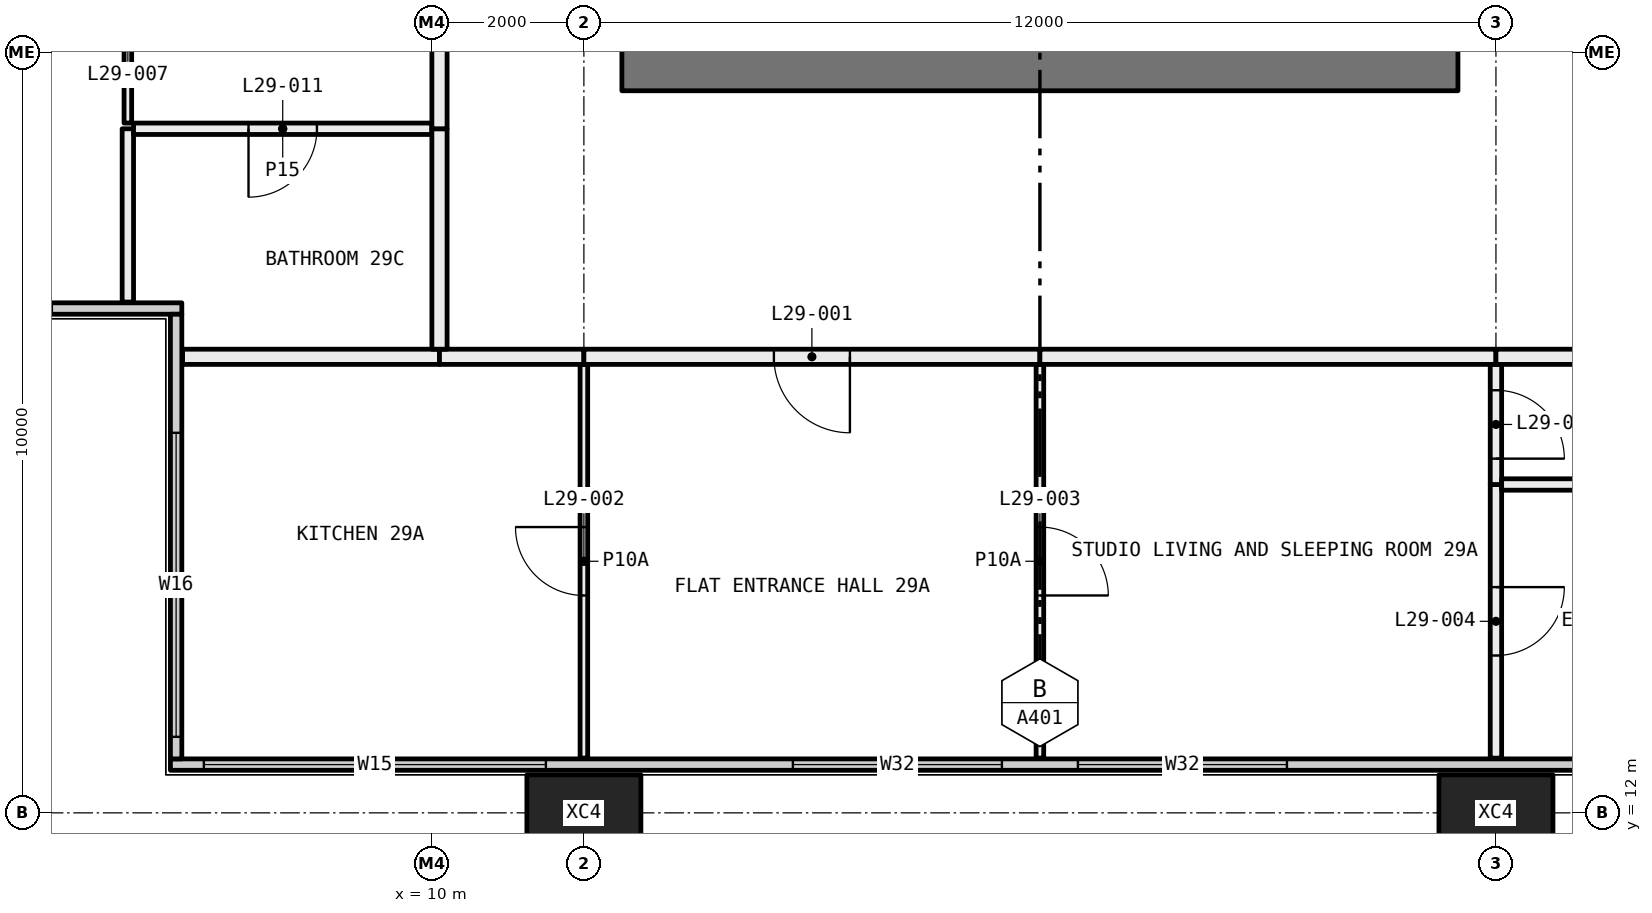
"""IFC4 building model, lengths in metres.
Left out: names, types, materials, properties, quantities, classifications, styles, units other than length and angle.
Written with IfcOpenShell. Run it as: python <this file> out.ifc"""

import sys

from ifc_helpers import new_model, si_unit, direction, frame, frame_2d, origin, origin_2d, place, context, subcontext, project, spatial, rectangle, hollow_rectangle, extrude, element, fill, save


model = new_model("IFC4")
c1 = context("Model", 3, precision=1e-05, world=origin(), true_north=direction((0.0, 1.0)))
c2 = subcontext(c1, "Body", "Model", "MODEL_VIEW")
j1 = project(units=[si_unit("LENGTHUNIT", "METRE"), si_unit("PLANEANGLEUNIT", "RADIAN")], contexts=[c1])
p1 = place(None, origin())
s1 = spatial("IfcSite", under=j1, at=p1, CompositionType="ELEMENT")
p2 = place(p1, origin())
s2 = spatial("IfcBuilding", under=s1, at=p2, CompositionType="ELEMENT")
p3 = place(p2, frame((0.0, 0.0, 113.85)))
s3 = spatial("IfcBuildingStorey", under=s2, at=p3, CompositionType="ELEMENT", Elevation=113.85)
for number, where, z_axis, x_axis in (
    (1, (12.0, 12.0, -0.4), (0.0, 0.0, 1.0), (1.0, 0.0, 0.0)),
    (2, (24.0, 12.0, -0.4), (0.0, 0.0, 1.0), (1.0, 0.0, 0.0)),
):
    element("IfcColumn", number, at=place(p3, frame(where, z_axis=z_axis, x_axis=x_axis)), inside=s3, PredefinedType="COLUMN", context=c2, shape_type="SweptSolid", body=[
        extrude(hollow_rectangle(XDim=1.5, YDim=1.0, WallThickness=0.06, at=origin_2d()), origin(), (0.0, 0.0, 1.0), 3.45),
    ])
p4 = place(p3, frame((6.56, 12.635, 0.0), z_axis=(0.0, 0.0, 1.0), x_axis=(1.0, 0.0, 0.0)))
e3 = element("IfcWall", 3, at=p4, inside=s3, PredefinedType="ELEMENTEDWALL", context=c2, shape_type="SweptSolid", body=[
    extrude(rectangle(XDim=58.88, YDim=0.15, at=frame_2d((29.44, 0.0))), origin(), (0.0, 0.0, 1.0), 3.05),
])
p5 = place(p4, frame((0.44, 0.0, 0.45)))
e4 = element("IfcOpeningElement", 4, at=p5, cuts=e3, PredefinedType="OPENING", context=c2, shape_type="SweptSolid", body=[
    extrude(rectangle(XDim=4.5, YDim=2.55, at=frame_2d((2.25, 1.275))), frame((0.0, 0.085, 0.0), z_axis=(0.0, -1.0, 0.0), x_axis=(1.0, 0.0, 0.0)), (0.0, 0.0, 1.0), 0.17),
])
p6 = place(p4, frame((8.19, 0.0, 0.45)))
e5 = element("IfcOpeningElement", 5, at=p6, cuts=e3, PredefinedType="OPENING", context=c2, shape_type="SweptSolid", body=[
    extrude(rectangle(XDim=2.75, YDim=2.55, at=frame_2d((1.375, 1.275))), frame((0.0, 0.085, 0.0), z_axis=(0.0, -1.0, 0.0), x_axis=(1.0, 0.0, 0.0)), (0.0, 0.0, 1.0), 0.17),
])
p7 = place(p4, frame((11.94, 0.0, 0.45)))
e6 = element("IfcOpeningElement", 6, at=p7, cuts=e3, PredefinedType="OPENING", context=c2, shape_type="SweptSolid", body=[
    extrude(rectangle(XDim=2.75, YDim=2.55, at=frame_2d((1.375, 1.275))), frame((0.0, 0.085, 0.0), z_axis=(0.0, -1.0, 0.0), x_axis=(1.0, 0.0, 0.0)), (0.0, 0.0, 1.0), 0.17),
])
p8 = place(p4, frame((20.19, 0.0, 0.45)))
e7 = element("IfcOpeningElement", 7, at=p8, cuts=e3, PredefinedType="OPENING", context=c2, shape_type="SweptSolid", body=[
    extrude(rectangle(XDim=2.75, YDim=2.55, at=frame_2d((1.375, 1.275))), frame((0.0, 0.085, 0.0), z_axis=(0.0, -1.0, 0.0), x_axis=(1.0, 0.0, 0.0)), (0.0, 0.0, 1.0), 0.17),
])
p9 = place(p4, frame((23.94, 0.0, 0.45)))
e8 = element("IfcOpeningElement", 8, at=p9, cuts=e3, PredefinedType="OPENING", context=c2, shape_type="SweptSolid", body=[
    extrude(rectangle(XDim=2.0, YDim=2.55, at=frame_2d((1.0, 1.275))), frame((0.0, 0.085, 0.0), z_axis=(0.0, -1.0, 0.0), x_axis=(1.0, 0.0, 0.0)), (0.0, 0.0, 1.0), 0.17),
])
p10 = place(p4, frame((32.19, 0.0, 0.45)))
e9 = element("IfcOpeningElement", 9, at=p10, cuts=e3, PredefinedType="OPENING", context=c2, shape_type="SweptSolid", body=[
    extrude(rectangle(XDim=2.75, YDim=2.55, at=frame_2d((1.375, 1.275))), frame((0.0, 0.085, 0.0), z_axis=(0.0, -1.0, 0.0), x_axis=(1.0, 0.0, 0.0)), (0.0, 0.0, 1.0), 0.17),
])
p11 = place(p4, frame((35.94, 0.0, 0.45)))
e10 = element("IfcOpeningElement", 10, at=p11, cuts=e3, PredefinedType="OPENING", context=c2, shape_type="SweptSolid", body=[
    extrude(rectangle(XDim=2.75, YDim=2.55, at=frame_2d((1.375, 1.275))), frame((0.0, 0.085, 0.0), z_axis=(0.0, -1.0, 0.0), x_axis=(1.0, 0.0, 0.0)), (0.0, 0.0, 1.0), 0.17),
])
p12 = place(p4, frame((44.19, 0.0, 0.45)))
e11 = element("IfcOpeningElement", 11, at=p12, cuts=e3, PredefinedType="OPENING", context=c2, shape_type="SweptSolid", body=[
    extrude(rectangle(XDim=2.75, YDim=2.55, at=frame_2d((1.375, 1.275))), frame((0.0, 0.085, 0.0), z_axis=(0.0, -1.0, 0.0), x_axis=(1.0, 0.0, 0.0)), (0.0, 0.0, 1.0), 0.17),
])
p13 = place(p4, frame((47.94, 0.0, 0.45)))
e12 = element("IfcOpeningElement", 12, at=p13, cuts=e3, PredefinedType="OPENING", context=c2, shape_type="SweptSolid", body=[
    extrude(rectangle(XDim=2.0, YDim=2.55, at=frame_2d((1.0, 1.275))), frame((0.0, 0.085, 0.0), z_axis=(0.0, -1.0, 0.0), x_axis=(1.0, 0.0, 0.0)), (0.0, 0.0, 1.0), 0.17),
])
p14 = place(p4, frame((53.94, 0.0, 0.45)))
e13 = element("IfcOpeningElement", 13, at=p14, cuts=e3, PredefinedType="OPENING", context=c2, shape_type="SweptSolid", body=[
    extrude(rectangle(XDim=4.5, YDim=2.55, at=frame_2d((2.25, 1.275))), frame((0.0, 0.085, 0.0), z_axis=(0.0, -1.0, 0.0), x_axis=(1.0, 0.0, 0.0)), (0.0, 0.0, 1.0), 0.17),
])
p15 = place(p3, frame((0.56, 18.635, 0.0), z_axis=(0.0, 0.0, 1.0), x_axis=(1.0, 0.0, 0.0)))
e14 = element("IfcWall", 14, at=p15, inside=s3, PredefinedType="ELEMENTEDWALL", context=c2, shape_type="SweptSolid", body=[
    extrude(rectangle(XDim=6.15, YDim=0.15, at=frame_2d((3.075, 0.0))), origin(), (0.0, 0.0, 1.0), 3.05),
])
p16 = place(p15, frame((0.44, 0.0, 0.45)))
e15 = element("IfcOpeningElement", 15, at=p16, cuts=e14, PredefinedType="OPENING", context=c2, shape_type="SweptSolid", body=[
    extrude(rectangle(XDim=4.0, YDim=2.55, at=frame_2d((2.0, 1.275))), frame((0.0, 0.085, 0.0), z_axis=(0.0, -1.0, 0.0), x_axis=(1.0, 0.0, 0.0)), (0.0, 0.0, 1.0), 0.17),
])
p17 = place(p3, frame((6.635, 12.71, 0.0), z_axis=(0.0, 0.0, 1.0), x_axis=(0.0, 1.0, 0.0)))
e16 = element("IfcWall", 16, at=p17, inside=s3, PredefinedType="ELEMENTEDWALL", context=c2, shape_type="SweptSolid", body=[
    extrude(rectangle(XDim=5.85, YDim=0.15, at=frame_2d((2.925, 0.0))), origin(), (0.0, 0.0, 1.0), 3.05),
])
p18 = place(p17, frame((0.29, 0.0, 0.45)))
e17 = element("IfcOpeningElement", 17, at=p18, cuts=e16, PredefinedType="OPENING", context=c2, shape_type="SweptSolid", body=[
    extrude(rectangle(XDim=4.0, YDim=2.55, at=frame_2d((2.0, 1.275))), frame((0.0, 0.085, 0.0), z_axis=(0.0, -1.0, 0.0), x_axis=(1.0, 0.0, 0.0)), (0.0, 0.0, 1.0), 0.17),
])
p19 = place(p3, frame((12.0, 12.72, 0.0), z_axis=(0.0, 0.0, 1.0), x_axis=(0.0, 1.0, 0.0)))
e18 = element("IfcWall", 18, at=p19, inside=s3, PredefinedType="PARTITIONING", context=c2, shape_type="SweptSolid", body=[
    extrude(rectangle(XDim=5.18, YDim=0.1, at=frame_2d((2.59, 0.0))), origin(), (0.0, 0.0, 1.0), 3.05),
])
p20 = place(p19, frame((2.14, 0.0, 0.0)))
e19 = element("IfcOpeningElement", 19, at=p20, cuts=e18, PredefinedType="OPENING", context=c2, shape_type="SweptSolid", body=[
    extrude(rectangle(XDim=0.9, YDim=2.1, at=frame_2d((0.45, 1.05))), frame((0.0, 0.06, 0.0), z_axis=(0.0, -1.0, 0.0), x_axis=(1.0, 0.0, 0.0)), (0.0, 0.0, 1.0), 0.12),
])
p21 = place(p3, frame((10.1, 18.0, 0.0), z_axis=(0.0, 0.0, 1.0), x_axis=(-1.0, 0.0, 0.0)))
e20 = element("IfcWall", 20, at=p21, inside=s3, PredefinedType="PARTITIONING", context=c2, shape_type="SweptSolid", body=[
    extrude(rectangle(XDim=3.38, YDim=0.2, at=frame_2d((1.69, 0.0))), origin(), (0.0, 0.0, 1.0), 3.05),
])
p22 = place(p3, frame((12.0, 18.0, 0.0), z_axis=(0.0, 0.0, 1.0), x_axis=(-1.0, 0.0, 0.0)))
e21 = element("IfcWall", 21, at=p22, inside=s3, PredefinedType="PARTITIONING", context=c2, shape_type="SweptSolid", body=[
    extrude(rectangle(XDim=1.9, YDim=0.2, at=frame_2d((0.95, 0.0))), origin(), (0.0, 0.0, 1.0), 3.05),
])
p23 = place(p3, frame((18.0, 12.72, 0.0), z_axis=(0.0, 0.0, 1.0), x_axis=(0.0, 1.0, 0.0)))
e22 = element("IfcWall", 22, at=p23, inside=s3, PredefinedType="PARTITIONING", context=c2, shape_type="SweptSolid", body=[
    extrude(rectangle(XDim=5.18, YDim=0.1, at=frame_2d((2.59, 0.0))), origin(), (0.0, 0.0, 1.0), 3.05),
])
p24 = place(p23, frame((2.14, 0.0, 0.0)))
e23 = element("IfcOpeningElement", 23, at=p24, cuts=e22, PredefinedType="OPENING", context=c2, shape_type="SweptSolid", body=[
    extrude(rectangle(XDim=0.9, YDim=2.1, at=frame_2d((0.45, 1.05))), frame((0.0, 0.06, 0.0), z_axis=(0.0, -1.0, 0.0), x_axis=(1.0, 0.0, 0.0)), (0.0, 0.0, 1.0), 0.12),
])
p25 = place(p3, frame((18.0, 18.0, 0.0), z_axis=(0.0, 0.0, 1.0), x_axis=(-1.0, 0.0, 0.0)))
e24 = element("IfcWall", 24, at=p25, inside=s3, PredefinedType="PARTITIONING", context=c2, shape_type="SweptSolid", body=[
    extrude(rectangle(XDim=6.0, YDim=0.2, at=frame_2d((3.0, 0.0))), origin(), (0.0, 0.0, 1.0), 3.05),
])
p26 = place(p25, frame((2.5, 0.0, 0.0)))
e25 = element("IfcOpeningElement", 25, at=p26, cuts=e24, PredefinedType="OPENING", context=c2, shape_type="SweptSolid", body=[
    extrude(rectangle(XDim=1.0, YDim=2.1, at=frame_2d((0.5, 1.05))), frame((0.0, 0.11, 0.0), z_axis=(0.0, -1.0, 0.0), x_axis=(1.0, 0.0, 0.0)), (0.0, 0.0, 1.0), 0.22),
])
p27 = place(p3, frame((24.0, 12.72, 0.0), z_axis=(0.0, 0.0, 1.0), x_axis=(0.0, 1.0, 0.0)))
e26 = element("IfcWall", 26, at=p27, inside=s3, PredefinedType="PARTITIONING", context=c2, shape_type="SweptSolid", body=[
    extrude(rectangle(XDim=3.6, YDim=0.15, at=frame_2d((1.8, 0.0))), origin(), (0.0, 0.0, 1.0), 3.05),
])
p28 = place(p27, frame((1.35, 0.0, 0.0)))
e27 = element("IfcOpeningElement", 27, at=p28, cuts=e26, PredefinedType="OPENING", context=c2, shape_type="SweptSolid", body=[
    extrude(rectangle(XDim=0.9, YDim=2.1, at=frame_2d((0.45, 1.05))), frame((0.0, 0.085, 0.0), z_axis=(0.0, -1.0, 0.0), x_axis=(1.0, 0.0, 0.0)), (0.0, 0.0, 1.0), 0.17),
])
p29 = place(p3, frame((24.0, 16.32, 0.0), z_axis=(0.0, 0.0, 1.0), x_axis=(0.0, 1.0, 0.0)))
e28 = element("IfcWall", 28, at=p29, inside=s3, PredefinedType="PARTITIONING", context=c2, shape_type="SweptSolid", body=[
    extrude(rectangle(XDim=1.58, YDim=0.15, at=frame_2d((0.79, 0.0))), origin(), (0.0, 0.0, 1.0), 3.05),
])
p30 = place(p29, frame((0.34, 0.0, 0.0)))
e29 = element("IfcOpeningElement", 29, at=p30, cuts=e28, PredefinedType="OPENING", context=c2, shape_type="SweptSolid", body=[
    extrude(rectangle(XDim=0.9, YDim=2.1, at=frame_2d((0.45, 1.05))), frame((0.0, 0.085, 0.0), z_axis=(0.0, -1.0, 0.0), x_axis=(1.0, 0.0, 0.0)), (0.0, 0.0, 1.0), 0.17),
])
p31 = place(p3, frame((24.0, 18.0, 0.0), z_axis=(0.0, 0.0, 1.0), x_axis=(-1.0, 0.0, 0.0)))
e30 = element("IfcWall", 30, at=p31, inside=s3, PredefinedType="PARTITIONING", context=c2, shape_type="SweptSolid", body=[
    extrude(rectangle(XDim=6.0, YDim=0.2, at=frame_2d((3.0, 0.0))), origin(), (0.0, 0.0, 1.0), 3.05),
])
p32 = place(p3, frame((29.9, 16.32, 0.0), z_axis=(0.0, 0.0, 1.0), x_axis=(-1.0, 0.0, 0.0)))
e31 = element("IfcWall", 31, at=p32, inside=s3, PredefinedType="PARTITIONING", context=c2, shape_type="SweptSolid", body=[
    extrude(rectangle(XDim=5.825, YDim=0.15, at=frame_2d((2.913, 0.0))), origin(), (0.0, 0.0, 1.0), 3.05),
])
p33 = place(p3, frame((25.9, 18.0, 0.0), z_axis=(0.0, 0.0, 1.0), x_axis=(-1.0, 0.0, 0.0)))
e32 = element("IfcWall", 32, at=p33, inside=s3, PredefinedType="PARTITIONING", context=c2, shape_type="SweptSolid", body=[
    extrude(rectangle(XDim=1.9, YDim=0.2, at=frame_2d((0.95, 0.0))), origin(), (0.0, 0.0, 1.0), 3.05),
])
p34 = place(p3, frame((6.0, 18.72, 0.0), z_axis=(0.0, 0.0, 1.0), x_axis=(0.0, 1.0, 0.0)))
e33 = element("IfcWall", 33, at=p34, inside=s3, PredefinedType="PARTITIONING", context=c2, shape_type="SweptSolid", body=[
    extrude(rectangle(XDim=2.28, YDim=0.15, at=frame_2d((1.14, 0.0))), origin(), (0.0, 0.0, 1.0), 3.05),
])
p35 = place(p3, frame((6.0, 21.075, 0.0), z_axis=(0.0, 0.0, 1.0), x_axis=(0.0, 1.0, 0.0)))
e34 = element("IfcWall", 34, at=p35, inside=s3, PredefinedType="PARTITIONING", context=c2, shape_type="SweptSolid", body=[
    extrude(rectangle(XDim=2.875, YDim=0.1, at=frame_2d((1.438, 0.0))), origin(), (0.0, 0.0, 1.0), 2.45),
])
p36 = place(p35, frame((0.988, 0.0, 0.0)))
e35 = element("IfcOpeningElement", 35, at=p36, cuts=e34, PredefinedType="OPENING", context=c2, shape_type="SweptSolid", body=[
    extrude(rectangle(XDim=0.9, YDim=2.1, at=frame_2d((0.45, 1.05))), frame((0.0, 0.06, 0.0), z_axis=(0.0, -1.0, 0.0), x_axis=(1.0, 0.0, 0.0)), (0.0, 0.0, 1.0), 0.12),
])
p37 = place(p3, frame((10.0, 21.0, 0.0), z_axis=(0.0, 0.0, 1.0), x_axis=(-1.0, 0.0, 0.0)))
e36 = element("IfcWall", 36, at=p37, inside=s3, PredefinedType="PARTITIONING", context=c2, shape_type="SweptSolid", body=[
    extrude(rectangle(XDim=3.925, YDim=0.15, at=frame_2d((1.962, 0.0))), origin(), (0.0, 0.0, 1.0), 3.05),
])
p38 = place(p37, frame((1.512, 0.0, 0.0)))
e37 = element("IfcOpeningElement", 37, at=p38, cuts=e36, PredefinedType="OPENING", context=c2, shape_type="SweptSolid", body=[
    extrude(rectangle(XDim=0.9, YDim=2.1, at=frame_2d((0.45, 1.05))), frame((0.0, 0.085, 0.0), z_axis=(0.0, -1.0, 0.0), x_axis=(1.0, 0.0, 0.0)), (0.0, 0.0, 1.0), 0.17),
])
p39 = place(p3, frame((10.1, 18.1, 0.0), z_axis=(0.0, 0.0, 1.0), x_axis=(0.0, 1.0, 0.0)))
e38 = element("IfcWall", 38, at=p39, inside=s3, PredefinedType="PARTITIONING", context=c2, shape_type="SweptSolid", body=[
    extrude(rectangle(XDim=2.9, YDim=0.2, at=frame_2d((1.45, 0.0))), origin(), (0.0, 0.0, 1.0), 3.05),
])
p40 = place(p3, frame((10.1, 21.0, 0.0), z_axis=(0.0, 0.0, 1.0), x_axis=(0.0, 1.0, 0.0)))
e39 = element("IfcWall", 39, at=p40, inside=s3, PredefinedType="PARTITIONING", context=c2, shape_type="SweptSolid", body=[
    extrude(rectangle(XDim=3.1, YDim=0.2, at=frame_2d((1.55, 0.0))), origin(), (0.0, 0.0, 1.0), 2.45),
])
p41 = place(p40, frame((1.05, 0.0, 0.0)))
e40 = element("IfcOpeningElement", 40, at=p41, cuts=e39, PredefinedType="OPENING", context=c2, shape_type="SweptSolid", body=[
    extrude(rectangle(XDim=1.0, YDim=2.1, at=frame_2d((0.5, 1.05))), frame((0.0, 0.11, 0.0), z_axis=(0.0, -1.0, 0.0), x_axis=(1.0, 0.0, 0.0)), (0.0, 0.0, 1.0), 0.22),
])
p42 = place(p3, frame((12.5, 21.825, 0.0), z_axis=(0.0, 0.0, 1.0), x_axis=(1.0, 0.0, 0.0)))
e41 = element("IfcWall", 41, at=p42, inside=s3, PredefinedType="SHEAR", context=c2, shape_type="SweptSolid", body=[
    extrude(rectangle(XDim=11.0, YDim=0.65, at=frame_2d((5.5, 0.0))), origin(), (0.0, 0.0, 1.0), 3.05),
])
p43 = place(p5, origin())
e42 = element("IfcWindow", 42, at=p43, inside=s3, PartitioningType="SINGLE_PANEL", PredefinedType="WINDOW", context=c2, shape_type="SweptSolid", body=[
    extrude(rectangle(XDim=4.5, YDim=2.55, at=frame_2d((2.25, 1.275))), frame((0.0, 0.03, 0.0), z_axis=(0.0, -1.0, 0.0), x_axis=(1.0, 0.0, 0.0)), (0.0, 0.0, 1.0), 0.06),
])
fill(e4, e42)
p44 = place(p6, origin())
e43 = element("IfcWindow", 43, at=p44, inside=s3, PartitioningType="SINGLE_PANEL", PredefinedType="WINDOW", context=c2, shape_type="SweptSolid", body=[
    extrude(rectangle(XDim=2.75, YDim=2.55, at=frame_2d((1.375, 1.275))), frame((0.0, 0.03, 0.0), z_axis=(0.0, -1.0, 0.0), x_axis=(1.0, 0.0, 0.0)), (0.0, 0.0, 1.0), 0.06),
])
fill(e5, e43)
p45 = place(p7, origin())
e44 = element("IfcWindow", 44, at=p45, inside=s3, PartitioningType="SINGLE_PANEL", PredefinedType="WINDOW", context=c2, shape_type="SweptSolid", body=[
    extrude(rectangle(XDim=2.75, YDim=2.55, at=frame_2d((1.375, 1.275))), frame((0.0, 0.03, 0.0), z_axis=(0.0, -1.0, 0.0), x_axis=(1.0, 0.0, 0.0)), (0.0, 0.0, 1.0), 0.06),
])
fill(e6, e44)
p46 = place(p18, origin())
e45 = element("IfcWindow", 45, at=p46, inside=s3, PartitioningType="SINGLE_PANEL", PredefinedType="WINDOW", context=c2, shape_type="SweptSolid", body=[
    extrude(rectangle(XDim=4.0, YDim=2.55, at=frame_2d((2.0, 1.275))), frame((0.0, 0.03, 0.0), z_axis=(0.0, -1.0, 0.0), x_axis=(1.0, 0.0, 0.0)), (0.0, 0.0, 1.0), 0.06),
])
fill(e17, e45)
p47 = place(p26, origin())
e46 = element("IfcDoor", 46, at=p47, inside=s3, OperationType="SINGLE_SWING_RIGHT", PredefinedType="DOOR", context=c2, shape_type="SweptSolid", body=[
    extrude(rectangle(XDim=1.0, YDim=2.1, at=frame_2d((0.5, 1.05))), frame((0.0, 0.025, 0.0), z_axis=(0.0, -1.0, 0.0), x_axis=(1.0, 0.0, 0.0)), (0.0, 0.0, 1.0), 0.05),
])
fill(e25, e46)
p48 = place(p20, origin())
e47 = element("IfcDoor", 47, at=p48, inside=s3, OperationType="SINGLE_SWING_LEFT", PredefinedType="DOOR", context=c2, shape_type="SweptSolid", body=[
    extrude(rectangle(XDim=0.9, YDim=2.1, at=frame_2d((0.45, 1.05))), frame((0.0, 0.025, 0.0), z_axis=(0.0, -1.0, 0.0), x_axis=(1.0, 0.0, 0.0)), (0.0, 0.0, 1.0), 0.05),
])
fill(e19, e47)
p49 = place(p24, frame((0.9, 0.0, 0.0), x_axis=(-1.0, 0.0, 0.0)))
e48 = element("IfcDoor", 48, at=p49, inside=s3, OperationType="SINGLE_SWING_LEFT", PredefinedType="DOOR", context=c2, shape_type="SweptSolid", body=[
    extrude(rectangle(XDim=0.9, YDim=2.1, at=frame_2d((0.45, 1.05))), frame((0.0, 0.025, 0.0), z_axis=(0.0, -1.0, 0.0), x_axis=(1.0, 0.0, 0.0)), (0.0, 0.0, 1.0), 0.05),
])
fill(e23, e48)
p50 = place(p28, frame((0.9, 0.0, 0.0), x_axis=(-1.0, 0.0, 0.0)))
e49 = element("IfcDoor", 49, at=p50, inside=s3, OperationType="SINGLE_SWING_RIGHT", PredefinedType="DOOR", context=c2, shape_type="SweptSolid", body=[
    extrude(rectangle(XDim=0.9, YDim=2.1, at=frame_2d((0.45, 1.05))), frame((0.0, 0.025, 0.0), z_axis=(0.0, -1.0, 0.0), x_axis=(1.0, 0.0, 0.0)), (0.0, 0.0, 1.0), 0.05),
])
fill(e27, e49)
p51 = place(p30, frame((0.9, 0.0, 0.0), x_axis=(-1.0, 0.0, 0.0)))
e50 = element("IfcDoor", 50, at=p51, inside=s3, OperationType="SINGLE_SWING_LEFT", PredefinedType="DOOR", context=c2, shape_type="SweptSolid", body=[
    extrude(rectangle(XDim=0.9, YDim=2.1, at=frame_2d((0.45, 1.05))), frame((0.0, 0.025, 0.0), z_axis=(0.0, -1.0, 0.0), x_axis=(1.0, 0.0, 0.0)), (0.0, 0.0, 1.0), 0.05),
])
fill(e29, e50)
p52 = place(p38, origin())
e51 = element("IfcDoor", 51, at=p52, inside=s3, OperationType="SINGLE_SWING_LEFT", PredefinedType="DOOR", context=c2, shape_type="SweptSolid", body=[
    extrude(rectangle(XDim=0.9, YDim=2.1, at=frame_2d((0.45, 1.05))), frame((0.0, 0.025, 0.0), z_axis=(0.0, -1.0, 0.0), x_axis=(1.0, 0.0, 0.0)), (0.0, 0.0, 1.0), 0.05),
])
fill(e37, e51)
save(model, sys.argv[1])
